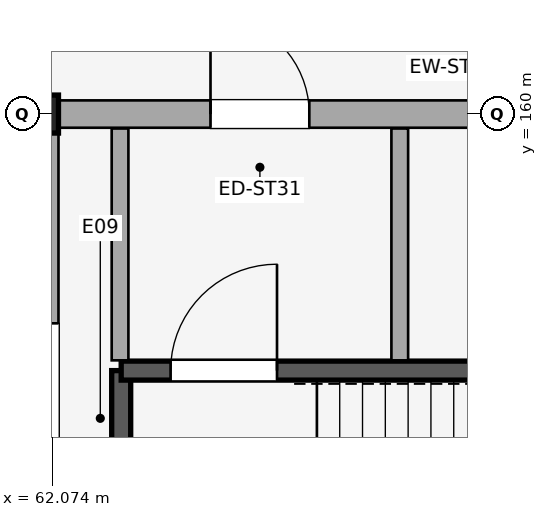
"""IFC4 building model, lengths in metres.
Left out: names, types, materials, properties, quantities, classifications, styles, units other than length and angle.
Written with IfcOpenShell. Run it as: python <this file> out.ifc"""

import sys

from ifc_helpers import new_model, si_unit, direction, frame, frame_2d, origin, origin_2d, place, context, subcontext, project, spatial, rectangle, i_section, extrude, element, fill, save


model = new_model("IFC4")
c1 = context("Model", 3, precision=1e-05, world=origin(), true_north=direction((0.0, 1.0)))
c2 = subcontext(c1, "Body", "Model", "MODEL_VIEW")
j1 = project(units=[si_unit("LENGTHUNIT", "METRE"), si_unit("PLANEANGLEUNIT", "RADIAN")], contexts=[c1])
p1 = place(None, origin())
s1 = spatial("IfcSite", under=j1, at=p1, CompositionType="ELEMENT")
p2 = place(p1, origin())
s2 = spatial("IfcBuilding", under=s1, at=p2, CompositionType="ELEMENT")
p3 = place(p2, origin())
s3 = spatial("IfcBuildingStorey", under=s2, at=p3, CompositionType="ELEMENT", Elevation=0.0)
p4 = place(p3, frame((62.0, 160.0, 0.0), z_axis=(0.0, 0.0, 1.0), x_axis=(1.0, 0.0, 0.0)))
e1 = element("IfcColumn", 1, at=p4, inside=s3, PredefinedType="COLUMN", context=c2, shape_type="SweptSolid", body=[
    extrude(i_section(OverallWidth=0.3, OverallDepth=0.5, WebThickness=0.014, FlangeThickness=0.028, FilletRadius=0.027, at=origin_2d()), origin(), (0.0, 0.0, 1.0), 5.4),
])
p5 = place(p3, frame((62.147, 160.0, 0.0), z_axis=(0.0, 0.0, 1.0), x_axis=(1.0, 0.0, 0.0)))
e2 = element("IfcWall", 2, at=p5, inside=s3, PredefinedType="STANDARD", context=c2, shape_type="SweptSolid", body=[
    extrude(rectangle(XDim=12.206, YDim=0.36, at=frame_2d((6.103, 0.0))), origin(), (0.0, 0.0, 1.0), 4.48),
])
p6 = place(p5, frame((2.003, 0.0, 0.0)))
e3 = element("IfcOpeningElement", 3, at=p6, cuts=e2, PredefinedType="OPENING", context=c2, shape_type="SweptSolid", body=[
    extrude(rectangle(XDim=1.3, YDim=2.2, at=frame_2d((0.65, 1.1))), frame((0.0, 0.19, 0.0), z_axis=(0.0, -1.0, 0.0), x_axis=(1.0, 0.0, 0.0)), (0.0, 0.0, 1.0), 0.38),
])
p7 = place(p5, frame((6.899, 0.0, 0.0)))
e4 = element("IfcOpeningElement", 4, at=p7, cuts=e2, PredefinedType="OPENING", context=c2, shape_type="SweptSolid", body=[
    extrude(rectangle(XDim=2.6, YDim=2.6, at=frame_2d((1.3, 1.3))), frame((0.0, 0.19, 0.0), z_axis=(0.0, -1.0, 0.0), x_axis=(1.0, 0.0, 0.0)), (0.0, 0.0, 1.0), 0.38),
])
p8 = place(p3, frame((62.0, 149.347, 0.0), z_axis=(0.0, 0.0, 1.0), x_axis=(0.0, 1.0, 0.0)))
e5 = element("IfcWall", 5, at=p8, inside=s3, PredefinedType="STANDARD", context=c2, shape_type="SweptSolid", body=[
    extrude(rectangle(XDim=10.406, YDim=0.3, at=frame_2d((5.203, 0.0))), origin(), (0.0, 0.0, 1.0), 4.48),
])
p9 = place(p8, frame((1.35, 0.0, 0.0)))
e6 = element("IfcOpeningElement", 6, at=p9, cuts=e5, PredefinedType="OPENING", context=c2, shape_type="SweptSolid", body=[
    extrude(rectangle(XDim=1.3, YDim=2.2, at=frame_2d((0.65, 1.1))), frame((0.0, 0.16, 0.0), z_axis=(0.0, -1.0, 0.0), x_axis=(1.0, 0.0, 0.0)), (0.0, 0.0, 1.0), 0.32),
])
p10 = place(p8, frame((5.4, 0.0, 0.0)))
e7 = element("IfcOpeningElement", 7, at=p10, cuts=e5, PredefinedType="OPENING", context=c2, shape_type="SweptSolid", body=[
    extrude(rectangle(XDim=2.5, YDim=2.5, at=frame_2d((1.25, 1.25))), frame((0.0, 0.16, 0.0), z_axis=(0.0, -1.0, 0.0), x_axis=(1.0, 0.0, 0.0)), (0.0, 0.0, 1.0), 0.32),
])
p11 = place(p3, frame((62.975, 156.625, 0.0), z_axis=(0.0, 0.0, 1.0), x_axis=(0.0, -1.0, 0.0)))
e8 = element("IfcWall", 8, at=p11, inside=s3, PredefinedType="SHEAR", context=c2, shape_type="SweptSolid", body=[
    extrude(rectangle(XDim=5.25, YDim=0.25, at=frame_2d((2.625, 0.0))), origin(), (0.0, 0.0, 1.0), 5.1),
])
p12 = place(p3, frame((73.425, 156.625, 0.0), z_axis=(0.0, 0.0, 1.0), x_axis=(-1.0, 0.0, 0.0)))
e9 = element("IfcWall", 9, at=p12, inside=s3, PredefinedType="SHEAR", context=c2, shape_type="SweptSolid", body=[
    extrude(rectangle(XDim=10.45, YDim=0.25, at=frame_2d((5.225, 0.0))), origin(), (0.0, 0.0, 1.0), 5.1),
])
p13 = place(p12, frame((8.4, 0.0, 0.0)))
e10 = element("IfcOpeningElement", 10, at=p13, cuts=e9, PredefinedType="OPENING", context=c2, shape_type="SweptSolid", body=[
    extrude(rectangle(XDim=1.4, YDim=2.2, at=frame_2d((0.7, 1.1))), frame((0.0, 0.135, 0.0), z_axis=(0.0, -1.0, 0.0), x_axis=(1.0, 0.0, 0.0)), (0.0, 0.0, 1.0), 0.27),
])
for number, where, z_axis, x_axis in (
    (11, (62.96, 156.76, 0.0), (0.0, 0.0, 1.0), (0.0, 1.0, 0.0)),
    (12, (66.64, 156.76, 0.0), (0.0, 0.0, 1.0), (0.0, 1.0, 0.0)),
):
    element("IfcWall", number, at=place(p3, frame(where, z_axis=z_axis, x_axis=x_axis)), inside=s3, PredefinedType="PARTITIONING", context=c2, shape_type="SweptSolid", body=[
        extrude(rectangle(XDim=3.05, YDim=0.22, at=frame_2d((1.525, 0.0))), origin(), (0.0, 0.0, 1.0), 3.69),
    ])
p14 = place(p6, origin())
e13 = element("IfcDoor", 13, at=p14, inside=s3, OperationType="SINGLE_SWING_LEFT", PredefinedType="DOOR", context=c2, shape_type="SweptSolid", body=[
    extrude(rectangle(XDim=1.3, YDim=2.2, at=frame_2d((0.65, 1.1))), frame((0.0, 0.025, 0.0), z_axis=(0.0, -1.0, 0.0), x_axis=(1.0, 0.0, 0.0)), (0.0, 0.0, 1.0), 0.05),
])
fill(e3, e13)
p15 = place(p13, frame((1.4, 0.0, 0.0), z_axis=(0.0, 0.0, 1.0), x_axis=(-1.0, 0.0, 0.0)))
e14 = element("IfcDoor", 14, at=p15, inside=s3, OperationType="SINGLE_SWING_RIGHT", PredefinedType="DOOR", context=c2, shape_type="SweptSolid", body=[
    extrude(rectangle(XDim=1.4, YDim=2.2, at=frame_2d((0.7, 1.1))), frame((0.0, 0.025, 0.0), z_axis=(0.0, -1.0, 0.0), x_axis=(1.0, 0.0, 0.0)), (0.0, 0.0, 1.0), 0.05),
])
fill(e10, e14)
save(model, sys.argv[1])
